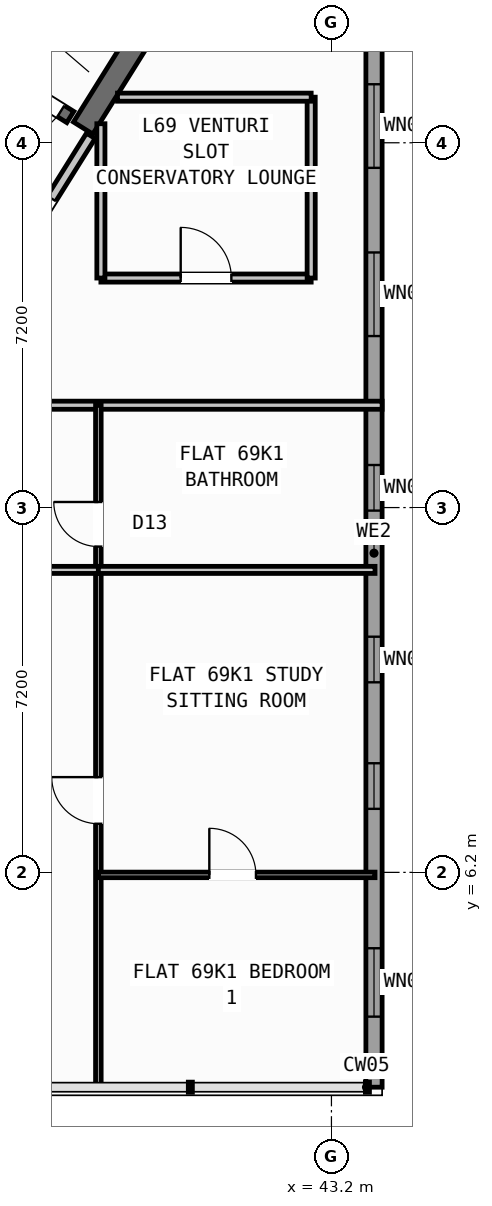
"""IFC4 building model, lengths in metres.
Left out: names, types, materials, properties, quantities, classifications, styles, units other than length and angle.
Written with IfcOpenShell. Run it as: python <this file> out.ifc"""

import sys

from ifc_helpers import new_model, si_unit, direction, frame, frame_2d, origin, place, context, subcontext, project, spatial, rectangle, extrude, source, transform, mapped, element, fill, save


model = new_model("IFC4")
c1 = context("Model", 3, precision=1e-05, world=origin(), true_north=direction((0.0, 1.0)))
c2 = subcontext(c1, "Body", "Model", "MODEL_VIEW")
j1 = project(units=[si_unit("LENGTHUNIT", "METRE"), si_unit("PLANEANGLEUNIT", "RADIAN")], contexts=[c1])
p1 = place(None, origin())
s1 = spatial("IfcSite", under=j1, at=p1, CompositionType="ELEMENT")
p2 = place(p1, origin())
s2 = spatial("IfcBuilding", under=s1, at=p2, CompositionType="ELEMENT")
p3 = place(p2, frame((0.0, 0.0, 273.6)))
s3 = spatial("IfcBuildingStorey", under=s2, at=p3, CompositionType="ELEMENT", Elevation=273.6)
p4 = place(p3, frame((40.221, 23.965, 0.0), z_axis=(0.0, 0.0, 1.0), x_axis=(-0.529902075036, -0.848058836916, 0.0)))
e1 = element("IfcWall", 1, at=p4, inside=s3, PredefinedType="SHEAR", context=c2, shape_type="SweptSolid", body=[
    extrude(rectangle(XDim=3.625, YDim=0.45, at=frame_2d((1.812, 0.0))), origin(), (0.0, 0.0, 1.0), 3.35),
])
p5 = place(p3, frame((44.04, 23.04, 0.0), z_axis=(0.0, 0.0, 1.0), x_axis=(0.0, -1.0, 0.0)))
e2 = element("IfcWall", 2, at=p5, inside=s3, PredefinedType="STANDARD", context=c2, shape_type="SweptSolid", body=[
    extrude(rectangle(XDim=21.08, YDim=0.32, at=frame_2d((10.54, 0.0))), origin(), (0.0, 0.0, 1.0), 3.35),
])
p6 = place(p5, frame((1.285, 0.0, 0.9)))
e3 = element("IfcOpeningElement", 3, at=p6, cuts=e2, PredefinedType="OPENING", context=c2, shape_type="SweptSolid", body=[
    extrude(rectangle(XDim=1.65, YDim=1.45, at=frame_2d((0.825, 0.725))), frame((0.0, 0.17, 0.0), z_axis=(0.0, -1.0, 0.0), x_axis=(1.0, 0.0, 0.0)), (0.0, 0.0, 1.0), 0.34),
])
p7 = place(p5, frame((4.605, 0.0, 0.9)))
e4 = element("IfcOpeningElement", 4, at=p7, cuts=e2, PredefinedType="OPENING", context=c2, shape_type="SweptSolid", body=[
    extrude(rectangle(XDim=1.65, YDim=1.45, at=frame_2d((0.825, 0.725))), frame((0.0, 0.17, 0.0), z_axis=(0.0, -1.0, 0.0), x_axis=(1.0, 0.0, 0.0)), (0.0, 0.0, 1.0), 0.34),
])
p8 = place(p5, frame((8.8, 0.0, 1.0)))
e5 = element("IfcOpeningElement", 5, at=p8, cuts=e2, PredefinedType="OPENING", context=c2, shape_type="SweptSolid", body=[
    extrude(rectangle(XDim=0.9, YDim=1.25, at=frame_2d((0.45, 0.625))), frame((0.0, 0.17, 0.0), z_axis=(0.0, -1.0, 0.0), x_axis=(1.0, 0.0, 0.0)), (0.0, 0.0, 1.0), 0.34),
])
p9 = place(p5, frame((12.189, 0.0, 1.0)))
e6 = element("IfcOpeningElement", 6, at=p9, cuts=e2, PredefinedType="OPENING", context=c2, shape_type="SweptSolid", body=[
    extrude(rectangle(XDim=0.9, YDim=1.25, at=frame_2d((0.45, 0.625))), frame((0.0, 0.17, 0.0), z_axis=(0.0, -1.0, 0.0), x_axis=(1.0, 0.0, 0.0)), (0.0, 0.0, 1.0), 0.34),
])
p10 = place(p5, frame((14.686, 0.0, 1.0)))
e7 = element("IfcOpeningElement", 7, at=p10, cuts=e2, PredefinedType="OPENING", context=c2, shape_type="SweptSolid", body=[
    extrude(rectangle(XDim=0.9, YDim=1.25, at=frame_2d((0.45, 0.625))), frame((0.0, 0.17, 0.0), z_axis=(0.0, -1.0, 0.0), x_axis=(1.0, 0.0, 0.0)), (0.0, 0.0, 1.0), 0.34),
])
p11 = place(p5, frame((18.337, 0.0, 0.9)))
e8 = element("IfcOpeningElement", 8, at=p11, cuts=e2, PredefinedType="OPENING", context=c2, shape_type="SweptSolid", body=[
    extrude(rectangle(XDim=1.35, YDim=1.45, at=frame_2d((0.675, 0.725))), frame((0.0, 0.17, 0.0), z_axis=(0.0, -1.0, 0.0), x_axis=(1.0, 0.0, 0.0)), (0.0, 0.0, 1.0), 0.34),
])
p12 = place(p3, frame((38.046, 21.108, 0.0), z_axis=(0.0, 0.0, 1.0), x_axis=(-0.848054434086, 0.529909121291, 0.0)))
e9 = element("IfcWall", 9, at=p12, inside=s3, PredefinedType="SHEAR", context=c2, shape_type="SweptSolid", body=[
    extrude(rectangle(XDim=7.33, YDim=0.26, at=frame_2d((3.665, 0.0))), origin(), (0.0, 0.0, 1.0), 3.35),
])
p13 = place(p12, frame((0.22, 0.0, 0.0)))
e10 = element("IfcOpeningElement", 10, at=p13, cuts=e9, PredefinedType="OPENING", context=c2, shape_type="SweptSolid", body=[
    extrude(rectangle(XDim=1.1, YDim=2.1, at=frame_2d((0.55, 1.05))), frame((0.0, 0.14, 0.0), z_axis=(0.0, -1.0, 0.0), x_axis=(1.0, 0.0, 0.0)), (0.0, 0.0, 1.0), 0.28),
])
p14 = place(p3, frame((38.451, 20.737, 0.0), z_axis=(0.0, 0.0, 1.0), x_axis=(-0.529924799939, -0.848044637038, 0.0)))
e11 = element("IfcWall", 11, at=p14, inside=s3, PredefinedType="STANDARD", context=c2, shape_type="SweptSolid", body=[
    extrude(rectangle(XDim=2.96, YDim=0.2, at=frame_2d((1.48, 0.0))), origin(), (0.0, 0.0, 1.0), 3.34),
])
p15 = place(p14, frame((1.46, 0.0, 0.0)))
e12 = element("IfcOpeningElement", 12, at=p15, cuts=e11, PredefinedType="OPENING", context=c2, shape_type="SweptSolid", body=[
    extrude(rectangle(XDim=0.86, YDim=2.05, at=frame_2d((0.43, 1.025))), frame((0.0, 0.11, 0.0), z_axis=(0.0, -1.0, 0.0), x_axis=(1.0, 0.0, 0.0)), (0.0, 0.0, 1.0), 0.22),
])
p16 = place(p3, frame((35.178, 15.42, 0.0), z_axis=(0.0, 0.0, 1.0), x_axis=(1.0, 0.0, 0.0)))
e13 = element("IfcWall", 13, at=p16, inside=s3, PredefinedType="PARTITIONING", context=c2, shape_type="SweptSolid", body=[
    extrude(rectangle(XDim=9.021, YDim=0.16, at=frame_2d((4.511, 0.0))), origin(), (0.0, 0.0, 1.0), 3.34),
])
p17 = place(p16, frame((1.422, 0.0, 0.0)))
e14 = element("IfcOpeningElement", 14, at=p17, cuts=e13, PredefinedType="OPENING", context=c2, shape_type="SweptSolid", body=[
    extrude(rectangle(XDim=1.0, YDim=2.1, at=frame_2d((0.5, 1.05))), frame((0.0, 0.09, 0.0), z_axis=(0.0, -1.0, 0.0), x_axis=(1.0, 0.0, 0.0)), (0.0, 0.0, 1.0), 0.18),
])
p18 = place(p3, frame((38.65, 17.93, 0.0), z_axis=(0.0, 0.0, 1.0), x_axis=(1.0, 0.0, 0.0)))
e15 = element("IfcWall", 15, at=p18, inside=s3, PredefinedType="PARTITIONING", context=c2, shape_type="SweptSolid", body=[
    extrude(rectangle(XDim=4.15, YDim=0.16, at=frame_2d((2.075, 0.0))), origin(), (0.0, 0.0, 1.0), 3.34),
])
p19 = place(p18, frame((1.575, 0.0, 0.0)))
e16 = element("IfcOpeningElement", 16, at=p19, cuts=e15, PredefinedType="OPENING", context=c2, shape_type="SweptSolid", body=[
    extrude(rectangle(XDim=1.0, YDim=2.1, at=frame_2d((0.5, 1.05))), frame((0.0, 0.09, 0.0), z_axis=(0.0, -1.0, 0.0), x_axis=(1.0, 0.0, 0.0)), (0.0, 0.0, 1.0), 0.18),
])
p20 = place(p3, frame((38.65, 17.93, 0.0), z_axis=(0.0, 0.0, 1.0), x_axis=(0.0, 1.0, 0.0)))
e17 = element("IfcWall", 17, at=p20, inside=s3, PredefinedType="PARTITIONING", context=c2, shape_type="SweptSolid", body=[
    extrude(rectangle(XDim=3.046, YDim=0.16, at=frame_2d((1.523, 0.0))), origin(), (0.0, 0.0, 1.0), 3.34),
])
p21 = place(p3, frame((42.8, 17.93, 0.0), z_axis=(0.0, 0.0, 1.0), x_axis=(0.0, 1.0, 0.0)))
e18 = element("IfcWall", 18, at=p21, inside=s3, PredefinedType="PARTITIONING", context=c2, shape_type="SweptSolid", body=[
    extrude(rectangle(XDim=3.57, YDim=0.16, at=frame_2d((1.785, 0.0))), origin(), (0.0, 0.0, 1.0), 3.34),
])
p22 = place(p3, frame((38.978, 21.5, 0.0), z_axis=(0.0, 0.0, 1.0), x_axis=(1.0, 0.0, 0.0)))
e19 = element("IfcWall", 19, at=p22, inside=s3, PredefinedType="PARTITIONING", context=c2, shape_type="SweptSolid", body=[
    extrude(rectangle(XDim=3.823, YDim=0.16, at=frame_2d((1.911, 0.0))), origin(), (0.0, 0.0, 1.0), 3.34),
])
p23 = place(p3, frame((38.6, 1.96, 0.0), z_axis=(0.0, 0.0, 1.0), x_axis=(0.0, 1.0, 0.0)))
e20 = element("IfcWall", 20, at=p23, inside=s3, PredefinedType="PARTITIONING", context=c2, shape_type="SweptSolid", body=[
    extrude(rectangle(XDim=13.46, YDim=0.11, at=frame_2d((6.73, 0.0))), origin(), (0.0, 0.0, 1.0), 3.34),
])
p24 = place(p23, frame((5.2, 0.0, 0.0)))
e21 = element("IfcOpeningElement", 21, at=p24, cuts=e20, PredefinedType="OPENING", context=c2, shape_type="SweptSolid", body=[
    extrude(rectangle(XDim=0.92, YDim=2.08, at=frame_2d((0.46, 1.04))), frame((0.0, 0.065, 0.0), z_axis=(0.0, -1.0, 0.0), x_axis=(1.0, 0.0, 0.0)), (0.0, 0.0, 1.0), 0.13),
])
p25 = place(p23, frame((10.67, 0.0, 0.0)))
e22 = element("IfcOpeningElement", 22, at=p25, cuts=e20, PredefinedType="OPENING", context=c2, shape_type="SweptSolid", body=[
    extrude(rectangle(XDim=0.88, YDim=2.08, at=frame_2d((0.44, 1.04))), frame((0.0, 0.065, 0.0), z_axis=(0.0, -1.0, 0.0), x_axis=(1.0, 0.0, 0.0)), (0.0, 0.0, 1.0), 0.13),
])
p26 = place(p3, frame((33.525, 12.17, 0.0), z_axis=(0.0, 0.0, 1.0), x_axis=(1.0, 0.0, 0.0)))
e23 = element("IfcWall", 23, at=p26, inside=s3, PredefinedType="PLUMBINGWALL", context=c2, shape_type="SweptSolid", body=[
    extrude(rectangle(XDim=5.075, YDim=0.14, at=frame_2d((2.538, 0.0))), origin(), (0.0, 0.0, 1.0), 3.34),
])
p27 = place(p26, frame((1.365, 0.0, 0.0)))
e24 = element("IfcOpeningElement", 24, at=p27, cuts=e23, PredefinedType="OPENING", context=c2, shape_type="SweptSolid", body=[
    extrude(rectangle(XDim=0.92, YDim=2.08, at=frame_2d((0.46, 1.04))), frame((0.0, 0.08, 0.0), z_axis=(0.0, -1.0, 0.0), x_axis=(1.0, 0.0, 0.0)), (0.0, 0.0, 1.0), 0.16),
])
p28 = place(p3, frame((38.6, 12.17, 0.0), z_axis=(0.0, 0.0, 1.0), x_axis=(1.0, 0.0, 0.0)))
e25 = element("IfcWall", 25, at=p28, inside=s3, PredefinedType="PLUMBINGWALL", context=c2, shape_type="SweptSolid", body=[
    extrude(rectangle(XDim=5.46, YDim=0.14, at=frame_2d((2.73, 0.0))), origin(), (0.0, 0.0, 1.0), 3.34),
])
p29 = place(p3, frame((38.6, 6.15, 0.0), z_axis=(0.0, 0.0, 1.0), x_axis=(1.0, 0.0, 0.0)))
e26 = element("IfcWall", 26, at=p29, inside=s3, PredefinedType="PARTITIONING", context=c2, shape_type="SweptSolid", body=[
    extrude(rectangle(XDim=5.46, YDim=0.11, at=frame_2d((2.73, 0.0))), origin(), (0.0, 0.0, 1.0), 3.34),
])
p30 = place(p29, frame((2.19, 0.0, 0.0)))
e27 = element("IfcOpeningElement", 27, at=p30, cuts=e26, PredefinedType="OPENING", context=c2, shape_type="SweptSolid", body=[
    extrude(rectangle(XDim=0.92, YDim=2.08, at=frame_2d((0.46, 1.04))), frame((0.0, 0.065, 0.0), z_axis=(0.0, -1.0, 0.0), x_axis=(1.0, 0.0, 0.0)), (0.0, 0.0, 1.0), 0.13),
])
m1 = source(origin(), c2, "Body", "SweptSolid", [
    extrude(rectangle(XDim=1.65, YDim=1.45, at=frame_2d((0.825, 0.725))), frame((0.0, 0.03, 0.0), z_axis=(0.0, -1.0, 0.0), x_axis=(1.0, 0.0, 0.0)), (0.0, 0.0, 1.0), 0.06),
])
p31 = place(p6, origin())
e28 = element("IfcWindow", 28, at=p31, inside=s3, PartitioningType="SINGLE_PANEL", PredefinedType="WINDOW", context=c2, shape_type="MappedRepresentation", body=[
    mapped(m1, transform((0.0, 0.0, 0.0), scale=1.0)),
])
fill(e3, e28)
p32 = place(p7, origin())
e29 = element("IfcWindow", 29, at=p32, inside=s3, PartitioningType="SINGLE_PANEL", PredefinedType="WINDOW", context=c2, shape_type="MappedRepresentation", body=[
    mapped(m1, transform((0.0, 0.0, 0.0), scale=1.0)),
])
fill(e4, e29)
m2 = source(origin(), c2, "Body", "SweptSolid", [
    extrude(rectangle(XDim=0.9, YDim=1.25, at=frame_2d((0.45, 0.625))), frame((0.0, 0.03, 0.0), z_axis=(0.0, -1.0, 0.0), x_axis=(1.0, 0.0, 0.0)), (0.0, 0.0, 1.0), 0.06),
])
p33 = place(p8, origin())
e30 = element("IfcWindow", 30, at=p33, inside=s3, PartitioningType="SINGLE_PANEL", PredefinedType="WINDOW", context=c2, shape_type="MappedRepresentation", body=[
    mapped(m2, transform((0.0, 0.0, 0.0), scale=1.0)),
])
fill(e5, e30)
p34 = place(p9, origin())
e31 = element("IfcWindow", 31, at=p34, inside=s3, PartitioningType="SINGLE_PANEL", PredefinedType="WINDOW", context=c2, shape_type="MappedRepresentation", body=[
    mapped(m2, transform((0.0, 0.0, 0.0), scale=1.0)),
])
fill(e6, e31)
p35 = place(p10, origin())
e32 = element("IfcWindow", 32, at=p35, inside=s3, PartitioningType="SINGLE_PANEL", PredefinedType="WINDOW", context=c2, shape_type="MappedRepresentation", body=[
    mapped(m2, transform((0.0, 0.0, 0.0), scale=1.0)),
])
fill(e7, e32)
m3 = source(origin(), c2, "Body", "SweptSolid", [
    extrude(rectangle(XDim=1.35, YDim=1.45, at=frame_2d((0.675, 0.725))), frame((0.0, 0.03, 0.0), z_axis=(0.0, -1.0, 0.0), x_axis=(1.0, 0.0, 0.0)), (0.0, 0.0, 1.0), 0.06),
])
p36 = place(p11, origin())
e33 = element("IfcWindow", 33, at=p36, inside=s3, PartitioningType="SINGLE_PANEL", PredefinedType="WINDOW", context=c2, shape_type="MappedRepresentation", body=[
    mapped(m3, transform((0.0, 0.0, 0.0), scale=1.0)),
])
fill(e8, e33)
m4 = source(origin(), c2, "Body", "SweptSolid", [
    extrude(rectangle(XDim=1.1, YDim=2.1, at=frame_2d((0.55, 1.05))), frame((0.0, 0.025, 0.0), z_axis=(0.0, -1.0, 0.0), x_axis=(1.0, 0.0, 0.0)), (0.0, 0.0, 1.0), 0.05),
])
p37 = place(p13, origin())
e34 = element("IfcDoor", 34, at=p37, inside=s3, OperationType="SINGLE_SWING_RIGHT", PredefinedType="DOOR", context=c2, shape_type="MappedRepresentation", body=[
    mapped(m4, transform((0.0, 0.0, 0.0), scale=1.0)),
])
fill(e10, e34)
m5 = source(origin(), c2, "Body", "SweptSolid", [
    extrude(rectangle(XDim=1.0, YDim=2.1, at=frame_2d((0.5, 1.05))), frame((0.0, 0.025, 0.0), z_axis=(0.0, -1.0, 0.0), x_axis=(1.0, 0.0, 0.0)), (0.0, 0.0, 1.0), 0.05),
])
p38 = place(p19, origin())
e35 = element("IfcDoor", 35, at=p38, inside=s3, OperationType="SINGLE_SWING_LEFT", PredefinedType="DOOR", context=c2, shape_type="MappedRepresentation", body=[
    mapped(m5, transform((0.0, 0.0, 0.0), scale=1.0)),
])
fill(e16, e35)
m6 = source(origin(), c2, "Body", "SweptSolid", [
    extrude(rectangle(XDim=0.86, YDim=2.05, at=frame_2d((0.43, 1.025))), frame((0.0, 0.025, 0.0), z_axis=(0.0, -1.0, 0.0), x_axis=(1.0, 0.0, 0.0)), (0.0, 0.0, 1.0), 0.05),
])
p39 = place(p15, frame((0.86, 0.0, 0.0), z_axis=(0.0, 0.0, 1.0), x_axis=(-1.0, 0.0, 0.0)))
e36 = element("IfcDoor", 36, at=p39, inside=s3, OperationType="SINGLE_SWING_LEFT", PredefinedType="DOOR", context=c2, shape_type="MappedRepresentation", body=[
    mapped(m6, transform((0.0, 0.0, 0.0), scale=1.0)),
])
fill(e12, e36)
m7 = source(origin(), c2, "Body", "SweptSolid", [
    extrude(rectangle(XDim=0.92, YDim=2.08, at=frame_2d((0.46, 1.04))), frame((0.0, 0.025, 0.0), z_axis=(0.0, -1.0, 0.0), x_axis=(1.0, 0.0, 0.0)), (0.0, 0.0, 1.0), 0.05),
])
p40 = place(p24, origin())
e37 = element("IfcDoor", 37, at=p40, inside=s3, OperationType="SINGLE_SWING_RIGHT", PredefinedType="DOOR", context=c2, shape_type="MappedRepresentation", body=[
    mapped(m7, transform((0.0, 0.0, 0.0), scale=1.0)),
])
fill(e21, e37)
p41 = place(p30, origin())
e38 = element("IfcDoor", 38, at=p41, inside=s3, OperationType="SINGLE_SWING_LEFT", PredefinedType="DOOR", context=c2, shape_type="MappedRepresentation", body=[
    mapped(m7, transform((0.0, 0.0, 0.0), scale=1.0)),
])
fill(e27, e38)
m8 = source(origin(), c2, "Body", "SweptSolid", [
    extrude(rectangle(XDim=0.88, YDim=2.08, at=frame_2d((0.44, 1.04))), frame((0.0, 0.025, 0.0), z_axis=(0.0, -1.0, 0.0), x_axis=(1.0, 0.0, 0.0)), (0.0, 0.0, 1.0), 0.05),
])
p42 = place(p25, origin())
e39 = element("IfcDoor", 39, at=p42, inside=s3, OperationType="SINGLE_SWING_RIGHT", PredefinedType="DOOR", context=c2, shape_type="MappedRepresentation", body=[
    mapped(m8, transform((0.0, 0.0, 0.0), scale=1.0)),
])
fill(e22, e39)
save(model, sys.argv[1])
